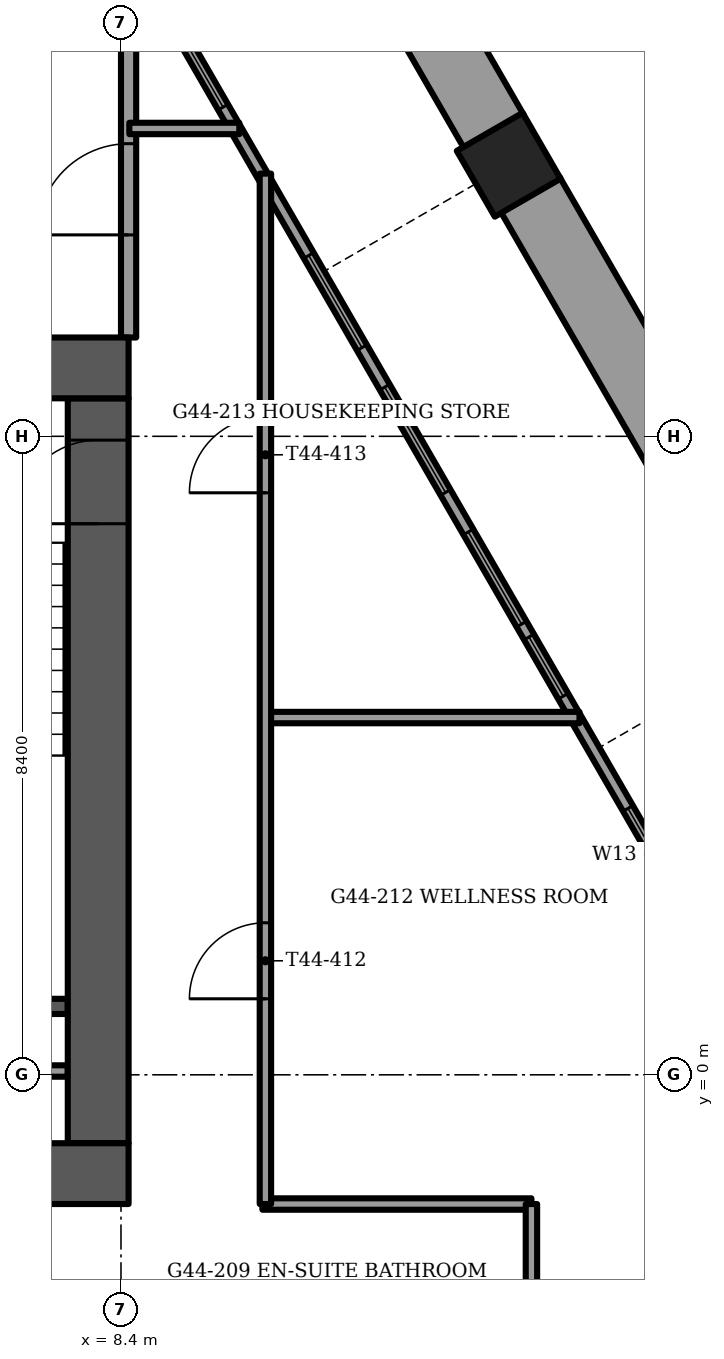
"""IFC4 building model, lengths in metres.
Left out: names, types, materials, properties, quantities, classifications, styles, units other than length and angle.
Written with IfcOpenShell. Run it as: python <this file> out.ifc"""

import sys

from ifc_helpers import new_model, si_unit, direction, frame, frame_2d, origin, origin_2d, place, context, subcontext, project, spatial, rectangle, extrude, element, fill, save


model = new_model("IFC4")
c1 = context("Model", 3, precision=1e-05, world=origin(), true_north=direction((0.0, 1.0)))
c2 = subcontext(c1, "Body", "Model", "MODEL_VIEW")
j1 = project(units=[si_unit("LENGTHUNIT", "METRE"), si_unit("PLANEANGLEUNIT", "RADIAN")], contexts=[c1])
p1 = place(None, origin())
s1 = spatial("IfcSite", under=j1, at=p1, CompositionType="ELEMENT")
p2 = place(p1, origin())
s2 = spatial("IfcBuilding", under=s1, at=p2, CompositionType="ELEMENT")
p3 = place(p2, frame((0.0, 0.0, 179.5)))
s3 = spatial("IfcBuildingStorey", under=s2, at=p3, CompositionType="ELEMENT", Elevation=179.5)
p4 = place(p3, frame((13.501, 11.972, -1.2), z_axis=(0.0, 0.0, 1.0), x_axis=(0.5, -0.866025403784, 0.0)))
e1 = element("IfcColumn", 1, at=p4, inside=s3, PredefinedType="COLUMN", context=c2, shape_type="SweptSolid", body=[
    extrude(rectangle(XDim=1.0, YDim=1.0, at=origin_2d()), origin(), (0.0, 0.0, 1.0), 3.75),
])
p5 = place(p3, frame((-8.5, -1.3, -0.3), z_axis=(0.0, 0.0, 1.0), x_axis=(1.0, 0.0, 0.0)))
e2 = element("IfcWall", 2, at=p5, inside=s3, PredefinedType="SHEAR", context=c2, shape_type="SweptSolid", body=[
    extrude(rectangle(XDim=17.0, YDim=0.8, at=frame_2d((8.5, 0.0))), origin(), (0.0, 0.0, 1.0), 3.75),
])
p6 = place(p5, frame((7.7, 0.0, 0.0)))
e3 = element("IfcOpeningElement", 3, at=p6, cuts=e2, PredefinedType="OPENING", context=c2, shape_type="SweptSolid", body=[
    extrude(rectangle(XDim=1.6, YDim=2.1, at=frame_2d((0.8, 1.05))), frame((0.0, 0.4, 0.0), z_axis=(0.0, -1.0, 0.0), x_axis=(1.0, 0.0, 0.0)), (0.0, 0.0, 1.0), 0.8),
])
p7 = place(p3, frame((-8.5, 9.3, -0.3), z_axis=(0.0, 0.0, 1.0), x_axis=(1.0, 0.0, 0.0)))
e4 = element("IfcWall", 4, at=p7, inside=s3, PredefinedType="SHEAR", context=c2, shape_type="SweptSolid", body=[
    extrude(rectangle(XDim=17.0, YDim=0.8, at=frame_2d((8.5, 0.0))), origin(), (0.0, 0.0, 1.0), 3.75),
])
p8 = place(p7, frame((7.7, 0.0, 0.0)))
e5 = element("IfcOpeningElement", 5, at=p8, cuts=e4, PredefinedType="OPENING", context=c2, shape_type="SweptSolid", body=[
    extrude(rectangle(XDim=1.6, YDim=2.1, at=frame_2d((0.8, 1.05))), frame((0.0, 0.4, 0.0), z_axis=(0.0, -1.0, 0.0), x_axis=(1.0, 0.0, 0.0)), (0.0, 0.0, 1.0), 0.8),
])
p9 = place(p7, frame((1.75, 0.0, 0.0)))
e6 = element("IfcOpeningElement", 6, at=p9, cuts=e4, PredefinedType="OPENING", context=c2, shape_type="SweptSolid", body=[
    extrude(rectangle(XDim=1.1, YDim=2.1, at=frame_2d((0.55, 1.05))), frame((0.0, 0.4, 0.0), z_axis=(0.0, -1.0, 0.0), x_axis=(1.0, 0.0, 0.0)), (0.0, 0.0, 1.0), 0.8),
])
p10 = place(p7, frame((14.15, 0.0, 0.0)))
e7 = element("IfcOpeningElement", 7, at=p10, cuts=e4, PredefinedType="OPENING", context=c2, shape_type="SweptSolid", body=[
    extrude(rectangle(XDim=1.1, YDim=2.1, at=frame_2d((0.55, 1.05))), frame((0.0, 0.4, 0.0), z_axis=(0.0, -1.0, 0.0), x_axis=(1.0, 0.0, 0.0)), (0.0, 0.0, 1.0), 0.8),
])
p11 = place(p3, frame((8.1, -0.9, -0.3), z_axis=(0.0, 0.0, 1.0), x_axis=(0.0, 1.0, 0.0)))
e8 = element("IfcWall", 8, at=p11, inside=s3, PredefinedType="SHEAR", context=c2, shape_type="SweptSolid", body=[
    extrude(rectangle(XDim=9.8, YDim=0.8, at=frame_2d((4.9, 0.0))), origin(), (0.0, 0.0, 1.0), 3.75),
])
p12 = place(p11, frame((8.15, 0.0, 0.0)))
e9 = element("IfcOpeningElement", 9, at=p12, cuts=e8, PredefinedType="OPENING", context=c2, shape_type="SweptSolid", body=[
    extrude(rectangle(XDim=1.1, YDim=2.1, at=frame_2d((0.55, 1.05))), frame((0.0, 0.4, 0.0), z_axis=(0.0, -1.0, 0.0), x_axis=(1.0, 0.0, 0.0)), (0.0, 0.0, 1.0), 0.8),
])
p13 = place(p3, frame((16.927, 6.138, 0.0), z_axis=(0.0, 0.0, 1.0), x_axis=(-0.499984268907, 0.866034485945, 0.0)))
e10 = element("IfcWall", 10, at=p13, inside=s3, PredefinedType="PARAPET", context=c2, shape_type="SweptSolid", body=[
    extrude(rectangle(XDim=6.296, YDim=0.9, at=frame_2d((3.148, 0.0))), origin(), (0.0, 0.0, 1.0), 1.1),
])
p14 = place(p3, frame((13.309, 12.404, 0.0), z_axis=(0.0, 0.0, 1.0), x_axis=(-0.500000968981, 0.866024844342, 0.0)))
e11 = element("IfcWall", 11, at=p14, inside=s3, PredefinedType="PARAPET", context=c2, shape_type="SweptSolid", body=[
    extrude(rectangle(XDim=6.323, YDim=0.9, at=frame_2d((3.162, 0.0))), origin(), (0.0, 0.0, 1.0), 1.1),
])
p15 = place(p3, frame((9.572, -14.271, 0.0), z_axis=(0.0, 0.0, 1.0), x_axis=(0.500005248668, 0.866022373443, 0.0)))
e12 = element("IfcWall", 12, at=p15, inside=s3, PredefinedType="SOLIDWALL", context=c2, shape_type="SweptSolid", body=[
    extrude(rectangle(XDim=15.145, YDim=0.15, at=frame_2d((7.573, 0.0))), origin(), (0.0, 0.0, 1.0), 3.45),
])
p16 = place(p15, frame((1.573, 0.0, 0.15)))
e13 = element("IfcOpeningElement", 13, at=p16, cuts=e12, PredefinedType="OPENING", context=c2, shape_type="SweptSolid", body=[
    extrude(rectangle(XDim=1.6, YDim=2.85, at=frame_2d((0.8, 1.425))), frame((0.0, 0.075, 0.0), z_axis=(0.0, -1.0, 0.0), x_axis=(1.0, 0.0, 0.0)), (0.0, 0.0, 1.0), 0.15),
])
p17 = place(p15, frame((3.773, 0.0, 0.0)))
e14 = element("IfcOpeningElement", 14, at=p17, cuts=e12, PredefinedType="OPENING", context=c2, shape_type="SweptSolid", body=[
    extrude(rectangle(XDim=1.4, YDim=2.4, at=frame_2d((0.7, 1.2))), frame((0.0, 0.075, 0.0), z_axis=(0.0, -1.0, 0.0), x_axis=(1.0, 0.0, 0.0)), (0.0, 0.0, 1.0), 0.15),
])
p18 = place(p15, frame((5.773, 0.0, 0.15)))
e15 = element("IfcOpeningElement", 15, at=p18, cuts=e12, PredefinedType="OPENING", context=c2, shape_type="SweptSolid", body=[
    extrude(rectangle(XDim=0.9, YDim=2.85, at=frame_2d((0.45, 1.425))), frame((0.0, 0.075, 0.0), z_axis=(0.0, -1.0, 0.0), x_axis=(1.0, 0.0, 0.0)), (0.0, 0.0, 1.0), 0.15),
])
p19 = place(p15, frame((6.93, 0.0, 0.0)))
e16 = element("IfcOpeningElement", 16, at=p19, cuts=e12, PredefinedType="OPENING", context=c2, shape_type="SweptSolid", body=[
    extrude(rectangle(XDim=1.4, YDim=2.4, at=frame_2d((0.7, 1.2))), frame((0.0, 0.075, 0.0), z_axis=(0.0, -1.0, 0.0), x_axis=(1.0, 0.0, 0.0)), (0.0, 0.0, 1.0), 0.15),
])
p20 = place(p15, frame((12.582, 0.0, 0.15)))
e17 = element("IfcOpeningElement", 17, at=p20, cuts=e12, PredefinedType="OPENING", context=c2, shape_type="SweptSolid", body=[
    extrude(rectangle(XDim=0.9, YDim=2.85, at=frame_2d((0.45, 1.425))), frame((0.0, 0.075, 0.0), z_axis=(0.0, -1.0, 0.0), x_axis=(1.0, 0.0, 0.0)), (0.0, 0.0, 1.0), 0.15),
])
p21 = place(p15, frame((10.482, 0.0, 0.15)))
e18 = element("IfcOpeningElement", 18, at=p21, cuts=e12, PredefinedType="OPENING", context=c2, shape_type="SweptSolid", body=[
    extrude(rectangle(XDim=1.4, YDim=2.85, at=frame_2d((0.7, 1.425))), frame((0.0, 0.075, 0.0), z_axis=(0.0, -1.0, 0.0), x_axis=(1.0, 0.0, 0.0)), (0.0, 0.0, 1.0), 0.15),
])
p22 = place(p3, frame((17.145, -0.089, 0.0), z_axis=(0.0, 0.0, 1.0), x_axis=(-0.499999728453, 0.866025560562, 0.0)))
e19 = element("IfcWall", 19, at=p22, inside=s3, PredefinedType="SOLIDWALL", context=c2, shape_type="SweptSolid", body=[
    extrude(rectangle(XDim=20.071, YDim=0.15, at=frame_2d((10.035, 0.0))), origin(), (0.0, 0.0, 1.0), 3.45),
])
p23 = place(p22, frame((0.55, 0.0, 0.15)))
e20 = element("IfcOpeningElement", 20, at=p23, cuts=e19, PredefinedType="OPENING", context=c2, shape_type="SweptSolid", body=[
    extrude(rectangle(XDim=1.6, YDim=2.85, at=frame_2d((0.8, 1.425))), frame((0.0, 0.075, 0.0), z_axis=(0.0, -1.0, 0.0), x_axis=(1.0, 0.0, 0.0)), (0.0, 0.0, 1.0), 0.15),
])
p24 = place(p22, frame((2.75, 0.0, 0.15)))
e21 = element("IfcOpeningElement", 21, at=p24, cuts=e19, PredefinedType="OPENING", context=c2, shape_type="SweptSolid", body=[
    extrude(rectangle(XDim=1.4, YDim=2.85, at=frame_2d((0.7, 1.425))), frame((0.0, 0.075, 0.0), z_axis=(0.0, -1.0, 0.0), x_axis=(1.0, 0.0, 0.0)), (0.0, 0.0, 1.0), 0.15),
])
p25 = place(p22, frame((5.854, 0.0, 0.15)))
e22 = element("IfcOpeningElement", 22, at=p25, cuts=e19, PredefinedType="OPENING", context=c2, shape_type="SweptSolid", body=[
    extrude(rectangle(XDim=0.9, YDim=2.85, at=frame_2d((0.45, 1.425))), frame((0.0, 0.075, 0.0), z_axis=(0.0, -1.0, 0.0), x_axis=(1.0, 0.0, 0.0)), (0.0, 0.0, 1.0), 0.15),
])
p26 = place(p22, frame((6.95, 0.0, 0.15)))
e23 = element("IfcOpeningElement", 23, at=p26, cuts=e19, PredefinedType="OPENING", context=c2, shape_type="SweptSolid", body=[
    extrude(rectangle(XDim=1.4, YDim=2.85, at=frame_2d((0.7, 1.425))), frame((0.0, 0.075, 0.0), z_axis=(0.0, -1.0, 0.0), x_axis=(1.0, 0.0, 0.0)), (0.0, 0.0, 1.0), 0.15),
])
p27 = place(p22, frame((8.95, 0.0, 0.15)))
e24 = element("IfcOpeningElement", 24, at=p27, cuts=e19, PredefinedType="OPENING", context=c2, shape_type="SweptSolid", body=[
    extrude(rectangle(XDim=1.6, YDim=2.85, at=frame_2d((0.8, 1.425))), frame((0.0, 0.075, 0.0), z_axis=(0.0, -1.0, 0.0), x_axis=(1.0, 0.0, 0.0)), (0.0, 0.0, 1.0), 0.15),
])
p28 = place(p22, frame((11.15, 0.0, 0.15)))
e25 = element("IfcOpeningElement", 25, at=p28, cuts=e19, PredefinedType="OPENING", context=c2, shape_type="SweptSolid", body=[
    extrude(rectangle(XDim=1.4, YDim=2.85, at=frame_2d((0.7, 1.425))), frame((0.0, 0.075, 0.0), z_axis=(0.0, -1.0, 0.0), x_axis=(1.0, 0.0, 0.0)), (0.0, 0.0, 1.0), 0.15),
])
p29 = place(p22, frame((14.803, 0.0, 0.15)))
e26 = element("IfcOpeningElement", 26, at=p29, cuts=e19, PredefinedType="OPENING", context=c2, shape_type="SweptSolid", body=[
    extrude(rectangle(XDim=1.6, YDim=2.85, at=frame_2d((0.8, 1.425))), frame((0.0, 0.075, 0.0), z_axis=(0.0, -1.0, 0.0), x_axis=(1.0, 0.0, 0.0)), (0.0, 0.0, 1.0), 0.15),
])
p30 = place(p22, frame((18.019, 0.0, 0.15)))
e27 = element("IfcOpeningElement", 27, at=p30, cuts=e19, PredefinedType="OPENING", context=c2, shape_type="SweptSolid", body=[
    extrude(rectangle(XDim=1.6, YDim=2.73, at=frame_2d((0.8, 1.365))), frame((0.0, 0.075, 0.0), z_axis=(0.0, -1.0, 0.0), x_axis=(1.0, 0.0, 0.0)), (0.0, 0.0, 1.0), 0.15),
])
p31 = place(p3, frame((4.45, 0.9, -0.3), z_axis=(0.0, 0.0, 1.0), x_axis=(1.0, 0.0, 0.0)))
e28 = element("IfcWall", 28, at=p31, inside=s3, PredefinedType="SOLIDWALL", context=c2, shape_type="SweptSolid", body=[
    extrude(rectangle(XDim=3.25, YDim=0.2, at=frame_2d((1.625, 0.0))), origin(), (0.0, 0.0, 1.0), 3.75),
])
p32 = place(p3, frame((3.8, 0.05, 0.0), z_axis=(0.0, 0.0, 1.0), x_axis=(1.0, 0.0, 0.0)))
e29 = element("IfcWall", 29, at=p32, inside=s3, PredefinedType="PARTITIONING", context=c2, shape_type="SweptSolid", body=[
    extrude(rectangle(XDim=3.9, YDim=0.15, at=frame_2d((1.95, 0.0))), origin(), (0.0, 0.0, 1.0), 3.45),
])
p33 = place(p3, frame((8.5, 9.7, 0.0), z_axis=(0.0, 0.0, 1.0), x_axis=(0.0, 1.0, 0.0)))
e30 = element("IfcWall", 30, at=p33, inside=s3, PredefinedType="PARTITIONING", context=c2, shape_type="SweptSolid", body=[
    extrude(rectangle(XDim=3.9, YDim=0.2, at=frame_2d((1.95, 0.0))), origin(), (0.0, 0.0, 1.0), 3.45),
])
p34 = place(p33, frame((1.35, 0.0, 0.0)))
e31 = element("IfcOpeningElement", 31, at=p34, cuts=e30, PredefinedType="OPENING", context=c2, shape_type="SweptSolid", body=[
    extrude(rectangle(XDim=1.2, YDim=2.1, at=frame_2d((0.6, 1.05))), frame((0.0, 0.1, 0.0), z_axis=(0.0, -1.0, 0.0), x_axis=(1.0, 0.0, 0.0)), (0.0, 0.0, 1.0), 0.2),
])
p35 = place(p3, frame((10.26, -1.7, 0.0), z_axis=(0.0, 0.0, 1.0), x_axis=(1.0, 0.0, 0.0)))
e32 = element("IfcWall", 32, at=p35, inside=s3, PredefinedType="PARTITIONING", context=c2, shape_type="SweptSolid", body=[
    extrude(rectangle(XDim=3.54, YDim=0.15, at=frame_2d((1.77, 0.0))), origin(), (0.0, 0.0, 1.0), 3.45),
])
p36 = place(p3, frame((10.3, 4.7, 0.0), z_axis=(0.0, 0.0, 1.0), x_axis=(1.0, 0.0, 0.0)))
e33 = element("IfcWall", 33, at=p36, inside=s3, PredefinedType="PARTITIONING", context=c2, shape_type="SweptSolid", body=[
    extrude(rectangle(XDim=4.132, YDim=0.15, at=frame_2d((2.066, 0.0))), origin(), (0.0, 0.0, 1.0), 3.45),
])
p37 = place(p3, frame((8.51, 12.45, 0.0), z_axis=(0.0, 0.0, 1.0), x_axis=(1.0, 0.0, 0.0)))
e34 = element("IfcWall", 34, at=p37, inside=s3, PredefinedType="PARTITIONING", context=c2, shape_type="SweptSolid", body=[
    extrude(rectangle(XDim=1.447, YDim=0.15, at=frame_2d((0.724, 0.0))), origin(), (0.0, 0.0, 1.0), 3.45),
])
p38 = place(p3, frame((13.8, -3.7, 0.0), z_axis=(0.0, 0.0, 1.0), x_axis=(0.0, 1.0, 0.0)))
e35 = element("IfcWall", 35, at=p38, inside=s3, PredefinedType="PARTITIONING", context=c2, shape_type="SweptSolid", body=[
    extrude(rectangle(XDim=2.0, YDim=0.15, at=frame_2d((1.0, 0.0))), origin(), (0.0, 0.0, 1.0), 3.45),
])
p39 = place(p3, frame((10.3, -1.7, 0.0), z_axis=(0.0, 0.0, 1.0), x_axis=(0.0, 1.0, 0.0)))
e36 = element("IfcWall", 36, at=p39, inside=s3, PredefinedType="PARTITIONING", context=c2, shape_type="SweptSolid", body=[
    extrude(rectangle(XDim=13.556, YDim=0.15, at=frame_2d((6.778, 0.0))), origin(), (0.0, 0.0, 1.0), 3.45),
])
p40 = place(p39, frame((2.7, 0.0, 0.0)))
e37 = element("IfcOpeningElement", 37, at=p40, cuts=e36, PredefinedType="OPENING", context=c2, shape_type="SweptSolid", body=[
    extrude(rectangle(XDim=1.0, YDim=2.1, at=frame_2d((0.5, 1.05))), frame((0.0, 0.075, 0.0), z_axis=(0.0, -1.0, 0.0), x_axis=(1.0, 0.0, 0.0)), (0.0, 0.0, 1.0), 0.15),
])
p41 = place(p39, frame((9.357, 0.0, 0.0)))
e38 = element("IfcOpeningElement", 38, at=p41, cuts=e36, PredefinedType="OPENING", context=c2, shape_type="SweptSolid", body=[
    extrude(rectangle(XDim=1.0, YDim=2.1, at=frame_2d((0.5, 1.05))), frame((0.0, 0.075, 0.0), z_axis=(0.0, -1.0, 0.0), x_axis=(1.0, 0.0, 0.0)), (0.0, 0.0, 1.0), 0.15),
])
p42 = place(p24, origin())
e39 = element("IfcWindow", 39, at=p42, inside=s3, PartitioningType="SINGLE_PANEL", PredefinedType="WINDOW", context=c2, shape_type="SweptSolid", body=[
    extrude(rectangle(XDim=1.4, YDim=2.85, at=frame_2d((0.7, 1.425))), frame((0.0, 0.03, 0.0), z_axis=(0.0, -1.0, 0.0), x_axis=(1.0, 0.0, 0.0)), (0.0, 0.0, 1.0), 0.06),
])
fill(e21, e39)
p43 = place(p25, origin())
e40 = element("IfcWindow", 40, at=p43, inside=s3, PartitioningType="SINGLE_PANEL", PredefinedType="WINDOW", context=c2, shape_type="SweptSolid", body=[
    extrude(rectangle(XDim=0.9, YDim=2.85, at=frame_2d((0.45, 1.425))), frame((0.0, 0.03, 0.0), z_axis=(0.0, -1.0, 0.0), x_axis=(1.0, 0.0, 0.0)), (0.0, 0.0, 1.0), 0.06),
])
fill(e22, e40)
p44 = place(p26, origin())
e41 = element("IfcWindow", 41, at=p44, inside=s3, PartitioningType="SINGLE_PANEL", PredefinedType="WINDOW", context=c2, shape_type="SweptSolid", body=[
    extrude(rectangle(XDim=1.4, YDim=2.85, at=frame_2d((0.7, 1.425))), frame((0.0, 0.03, 0.0), z_axis=(0.0, -1.0, 0.0), x_axis=(1.0, 0.0, 0.0)), (0.0, 0.0, 1.0), 0.06),
])
fill(e23, e41)
p45 = place(p27, origin())
e42 = element("IfcWindow", 42, at=p45, inside=s3, PartitioningType="SINGLE_PANEL", PredefinedType="WINDOW", context=c2, shape_type="SweptSolid", body=[
    extrude(rectangle(XDim=1.6, YDim=2.85, at=frame_2d((0.8, 1.425))), frame((0.0, 0.03, 0.0), z_axis=(0.0, -1.0, 0.0), x_axis=(1.0, 0.0, 0.0)), (0.0, 0.0, 1.0), 0.06),
])
fill(e24, e42)
p46 = place(p28, origin())
e43 = element("IfcWindow", 43, at=p46, inside=s3, PartitioningType="SINGLE_PANEL", PredefinedType="WINDOW", context=c2, shape_type="SweptSolid", body=[
    extrude(rectangle(XDim=1.4, YDim=2.85, at=frame_2d((0.7, 1.425))), frame((0.0, 0.03, 0.0), z_axis=(0.0, -1.0, 0.0), x_axis=(1.0, 0.0, 0.0)), (0.0, 0.0, 1.0), 0.06),
])
fill(e25, e43)
p47 = place(p29, origin())
e44 = element("IfcWindow", 44, at=p47, inside=s3, PartitioningType="SINGLE_PANEL", PredefinedType="WINDOW", context=c2, shape_type="SweptSolid", body=[
    extrude(rectangle(XDim=1.6, YDim=2.85, at=frame_2d((0.8, 1.425))), frame((0.0, 0.03, 0.0), z_axis=(0.0, -1.0, 0.0), x_axis=(1.0, 0.0, 0.0)), (0.0, 0.0, 1.0), 0.06),
])
fill(e26, e44)
p48 = place(p12, origin())
e45 = element("IfcDoor", 45, at=p48, inside=s3, OperationType="SINGLE_SWING_LEFT", PredefinedType="DOOR", context=c2, shape_type="SweptSolid", body=[
    extrude(rectangle(XDim=1.1, YDim=2.1, at=frame_2d((0.55, 1.05))), frame((0.0, 0.025, 0.0), z_axis=(0.0, -1.0, 0.0), x_axis=(1.0, 0.0, 0.0)), (0.0, 0.0, 1.0), 0.05),
])
fill(e9, e45)
p49 = place(p34, origin())
e46 = element("IfcDoor", 46, at=p49, inside=s3, OperationType="SINGLE_SWING_LEFT", PredefinedType="DOOR", context=c2, shape_type="SweptSolid", body=[
    extrude(rectangle(XDim=1.2, YDim=2.1, at=frame_2d((0.6, 1.05))), frame((0.0, 0.025, 0.0), z_axis=(0.0, -1.0, 0.0), x_axis=(1.0, 0.0, 0.0)), (0.0, 0.0, 1.0), 0.05),
])
fill(e31, e46)
p50 = place(p40, origin())
e47 = element("IfcDoor", 47, at=p50, inside=s3, OperationType="SINGLE_SWING_LEFT", PredefinedType="DOOR", context=c2, shape_type="SweptSolid", body=[
    extrude(rectangle(XDim=1.0, YDim=2.1, at=frame_2d((0.5, 1.05))), frame((0.0, 0.025, 0.0), z_axis=(0.0, -1.0, 0.0), x_axis=(1.0, 0.0, 0.0)), (0.0, 0.0, 1.0), 0.05),
])
fill(e37, e47)
p51 = place(p41, origin())
e48 = element("IfcDoor", 48, at=p51, inside=s3, OperationType="SINGLE_SWING_LEFT", PredefinedType="DOOR", context=c2, shape_type="SweptSolid", body=[
    extrude(rectangle(XDim=1.0, YDim=2.1, at=frame_2d((0.5, 1.05))), frame((0.0, 0.025, 0.0), z_axis=(0.0, -1.0, 0.0), x_axis=(1.0, 0.0, 0.0)), (0.0, 0.0, 1.0), 0.05),
])
fill(e38, e48)
save(model, sys.argv[1])
